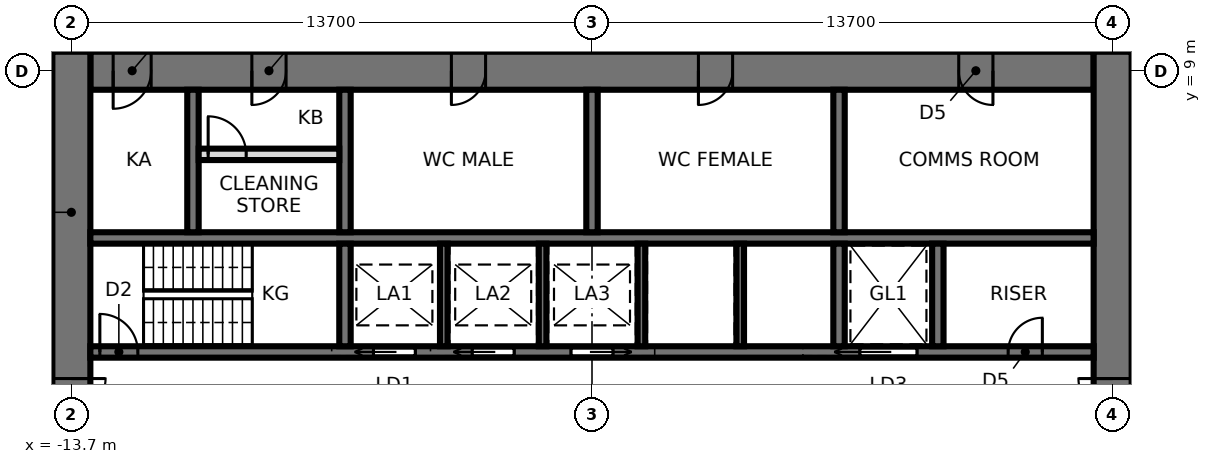
"""IFC4 building model, lengths in metres.
Left out: names, types, materials, properties, quantities, classifications, styles, units other than length and angle.
Written with IfcOpenShell. Run it as: python <this file> out.ifc"""

import sys

from ifc_helpers import new_model, si_unit, direction, frame, frame_2d, origin, place, context, subcontext, project, spatial, rectangle, extrude, element, fill, save


model = new_model("IFC4")
c1 = context("Model", 3, precision=1e-05, world=origin(), true_north=direction((0.0, 1.0)))
c2 = subcontext(c1, "Body", "Model", "MODEL_VIEW")
j1 = project(units=[si_unit("LENGTHUNIT", "METRE"), si_unit("PLANEANGLEUNIT", "RADIAN")], contexts=[c1])
p1 = place(None, origin())
s1 = spatial("IfcSite", under=j1, at=p1, CompositionType="ELEMENT")
p2 = place(p1, origin())
s2 = spatial("IfcBuilding", under=s1, at=p2, CompositionType="ELEMENT")
p3 = place(p2, frame((0.0, 0.0, 65.8)))
s3 = spatial("IfcBuildingStorey", under=s2, at=p3, CompositionType="ELEMENT", Elevation=65.8)
p4 = place(p3, frame((13.2, 9.0, 0.0), z_axis=(0.0, 0.0, 1.0), x_axis=(-1.0, 0.0, 0.0)))
e1 = element("IfcWall", 1, at=p4, inside=s3, PredefinedType="SHEAR", context=c2, shape_type="SweptSolid", body=[
    extrude(rectangle(XDim=26.4, YDim=1.0, at=frame_2d((13.2, 0.0))), origin(), (0.0, 0.0, 1.0), 4.2),
])
p5 = place(p4, frame((2.65, 0.0, 0.0)))
e2 = element("IfcOpeningElement", 2, at=p5, cuts=e1, PredefinedType="OPENING", context=c2, shape_type="SweptSolid", body=[
    extrude(rectangle(XDim=0.9, YDim=2.1, at=frame_2d((0.45, 1.05))), frame((0.0, 0.51, 0.0), z_axis=(0.0, -1.0, 0.0), x_axis=(1.0, 0.0, 0.0)), (0.0, 0.0, 1.0), 1.02),
])
p6 = place(p4, frame((9.5, 0.0, 0.0)))
e3 = element("IfcOpeningElement", 3, at=p6, cuts=e1, PredefinedType="OPENING", context=c2, shape_type="SweptSolid", body=[
    extrude(rectangle(XDim=0.9, YDim=2.1, at=frame_2d((0.45, 1.05))), frame((0.0, 0.51, 0.0), z_axis=(0.0, -1.0, 0.0), x_axis=(1.0, 0.0, 0.0)), (0.0, 0.0, 1.0), 1.02),
])
p7 = place(p4, frame((16.0, 0.0, 0.0)))
e4 = element("IfcOpeningElement", 4, at=p7, cuts=e1, PredefinedType="OPENING", context=c2, shape_type="SweptSolid", body=[
    extrude(rectangle(XDim=0.9, YDim=2.1, at=frame_2d((0.45, 1.05))), frame((0.0, 0.51, 0.0), z_axis=(0.0, -1.0, 0.0), x_axis=(1.0, 0.0, 0.0)), (0.0, 0.0, 1.0), 1.02),
])
p8 = place(p4, frame((21.25, 0.0, 0.0)))
e5 = element("IfcOpeningElement", 5, at=p8, cuts=e1, PredefinedType="OPENING", context=c2, shape_type="SweptSolid", body=[
    extrude(rectangle(XDim=0.9, YDim=2.1, at=frame_2d((0.45, 1.05))), frame((0.0, 0.51, 0.0), z_axis=(0.0, -1.0, 0.0), x_axis=(1.0, 0.0, 0.0)), (0.0, 0.0, 1.0), 1.02),
])
p9 = place(p4, frame((24.8, 0.0, 0.0)))
e6 = element("IfcOpeningElement", 6, at=p9, cuts=e1, PredefinedType="OPENING", context=c2, shape_type="SweptSolid", body=[
    extrude(rectangle(XDim=1.0, YDim=2.1, at=frame_2d((0.5, 1.05))), frame((0.0, 0.51, 0.0), z_axis=(0.0, -1.0, 0.0), x_axis=(1.0, 0.0, 0.0)), (0.0, 0.0, 1.0), 1.02),
])
p10 = place(p3, frame((13.7, -9.5, 0.0), z_axis=(0.0, 0.0, 1.0), x_axis=(0.0, 1.0, 0.0)))
e7 = element("IfcWall", 7, at=p10, inside=s3, PredefinedType="SHEAR", context=c2, shape_type="SweptSolid", body=[
    extrude(rectangle(XDim=19.0, YDim=1.0, at=frame_2d((9.5, 0.0))), origin(), (0.0, 0.0, 1.0), 4.2),
])
p11 = place(p10, frame((8.6, 0.0, 0.0)))
e8 = element("IfcOpeningElement", 8, at=p11, cuts=e7, PredefinedType="OPENING", context=c2, shape_type="SweptSolid", body=[
    extrude(rectangle(XDim=1.8, YDim=2.4, at=frame_2d((0.9, 1.2))), frame((0.0, 0.51, 0.0), z_axis=(0.0, -1.0, 0.0), x_axis=(1.0, 0.0, 0.0)), (0.0, 0.0, 1.0), 1.02),
])
p12 = place(p3, frame((-13.7, 9.5, 0.0), z_axis=(0.0, 0.0, 1.0), x_axis=(0.0, -1.0, 0.0)))
e9 = element("IfcWall", 9, at=p12, inside=s3, PredefinedType="SHEAR", context=c2, shape_type="SweptSolid", body=[
    extrude(rectangle(XDim=19.0, YDim=1.0, at=frame_2d((9.5, 0.0))), origin(), (0.0, 0.0, 1.0), 4.2),
])
p13 = place(p12, frame((8.6, 0.0, 0.0)))
e10 = element("IfcOpeningElement", 10, at=p13, cuts=e9, PredefinedType="OPENING", context=c2, shape_type="SweptSolid", body=[
    extrude(rectangle(XDim=1.8, YDim=2.4, at=frame_2d((0.9, 1.2))), frame((0.0, 0.51, 0.0), z_axis=(0.0, -1.0, 0.0), x_axis=(1.0, 0.0, 0.0)), (0.0, 0.0, 1.0), 1.02),
])
p14 = place(p3, frame((-13.2, 1.6, 0.0), z_axis=(0.0, 0.0, 1.0), x_axis=(1.0, 0.0, 0.0)))
e11 = element("IfcWall", 11, at=p14, inside=s3, PredefinedType="SHEAR", context=c2, shape_type="SweptSolid", body=[
    extrude(rectangle(XDim=26.4, YDim=0.3, at=frame_2d((13.2, 0.0))), origin(), (0.0, 0.0, 1.0), 4.2),
])
p15 = place(p14, frame((0.25, 0.0, 0.0)))
e12 = element("IfcOpeningElement", 12, at=p15, cuts=e11, PredefinedType="OPENING", context=c2, shape_type="SweptSolid", body=[
    extrude(rectangle(XDim=1.0, YDim=2.1, at=frame_2d((0.5, 1.05))), frame((0.0, 0.16, 0.0), z_axis=(0.0, -1.0, 0.0), x_axis=(1.0, 0.0, 0.0)), (0.0, 0.0, 1.0), 0.32),
])
p16 = place(p14, frame((20.25, 0.0, 0.0)))
e13 = element("IfcOpeningElement", 13, at=p16, cuts=e11, PredefinedType="OPENING", context=c2, shape_type="SweptSolid", body=[
    extrude(rectangle(XDim=1.5, YDim=2.4, at=frame_2d((0.75, 1.2))), frame((0.0, 0.16, 0.0), z_axis=(0.0, -1.0, 0.0), x_axis=(1.0, 0.0, 0.0)), (0.0, 0.0, 1.0), 0.32),
])
p17 = place(p14, frame((7.45, 0.0, 0.0)))
e14 = element("IfcOpeningElement", 14, at=p17, cuts=e11, PredefinedType="OPENING", context=c2, shape_type="SweptSolid", body=[
    extrude(rectangle(XDim=1.1, YDim=2.3, at=frame_2d((0.55, 1.15))), frame((0.0, 0.16, 0.0), z_axis=(0.0, -1.0, 0.0), x_axis=(1.0, 0.0, 0.0)), (0.0, 0.0, 1.0), 0.32),
])
p18 = place(p14, frame((10.05, 0.0, 0.0)))
e15 = element("IfcOpeningElement", 15, at=p18, cuts=e11, PredefinedType="OPENING", context=c2, shape_type="SweptSolid", body=[
    extrude(rectangle(XDim=1.1, YDim=2.3, at=frame_2d((0.55, 1.15))), frame((0.0, 0.16, 0.0), z_axis=(0.0, -1.0, 0.0), x_axis=(1.0, 0.0, 0.0)), (0.0, 0.0, 1.0), 0.32),
])
p19 = place(p14, frame((12.65, 0.0, 0.0)))
e16 = element("IfcOpeningElement", 16, at=p19, cuts=e11, PredefinedType="OPENING", context=c2, shape_type="SweptSolid", body=[
    extrude(rectangle(XDim=1.1, YDim=2.3, at=frame_2d((0.55, 1.15))), frame((0.0, 0.16, 0.0), z_axis=(0.0, -1.0, 0.0), x_axis=(1.0, 0.0, 0.0)), (0.0, 0.0, 1.0), 0.32),
])
p20 = place(p14, frame((24.15, 0.0, 0.0)))
e17 = element("IfcOpeningElement", 17, at=p20, cuts=e11, PredefinedType="OPENING", context=c2, shape_type="SweptSolid", body=[
    extrude(rectangle(XDim=0.9, YDim=2.1, at=frame_2d((0.45, 1.05))), frame((0.0, 0.16, 0.0), z_axis=(0.0, -1.0, 0.0), x_axis=(1.0, 0.0, 0.0)), (0.0, 0.0, 1.0), 0.32),
])
p21 = place(p3, frame((-13.2, 4.6, 0.0), z_axis=(0.0, 0.0, 1.0), x_axis=(1.0, 0.0, 0.0)))
e18 = element("IfcWall", 18, at=p21, inside=s3, PredefinedType="SHEAR", context=c2, shape_type="SweptSolid", body=[
    extrude(rectangle(XDim=26.4, YDim=0.3, at=frame_2d((13.2, 0.0))), origin(), (0.0, 0.0, 1.0), 4.2),
])
p22 = place(p3, frame((-6.5, 1.75, 0.0), z_axis=(0.0, 0.0, 1.0), x_axis=(0.0, 1.0, 0.0)))
e19 = element("IfcWall", 19, at=p22, inside=s3, PredefinedType="SHEAR", context=c2, shape_type="SweptSolid", body=[
    extrude(rectangle(XDim=2.7, YDim=0.3, at=frame_2d((1.35, 0.0))), origin(), (0.0, 0.0, 1.0), 4.2),
])
p23 = place(p3, frame((-6.5, 4.75, 0.0), z_axis=(0.0, 0.0, 1.0), x_axis=(0.0, 1.0, 0.0)))
e20 = element("IfcWall", 20, at=p23, inside=s3, PredefinedType="SHEAR", context=c2, shape_type="SweptSolid", body=[
    extrude(rectangle(XDim=3.75, YDim=0.3, at=frame_2d((1.875, 0.0))), origin(), (0.0, 0.0, 1.0), 4.2),
])
p24 = place(p3, frame((6.5, 1.75, 0.0), z_axis=(0.0, 0.0, 1.0), x_axis=(0.0, 1.0, 0.0)))
e21 = element("IfcWall", 21, at=p24, inside=s3, PredefinedType="SHEAR", context=c2, shape_type="SweptSolid", body=[
    extrude(rectangle(XDim=2.7, YDim=0.3, at=frame_2d((1.35, 0.0))), origin(), (0.0, 0.0, 1.0), 4.2),
])
p25 = place(p3, frame((6.5, 4.75, 0.0), z_axis=(0.0, 0.0, 1.0), x_axis=(0.0, 1.0, 0.0)))
e22 = element("IfcWall", 22, at=p25, inside=s3, PredefinedType="SHEAR", context=c2, shape_type="SweptSolid", body=[
    extrude(rectangle(XDim=3.75, YDim=0.3, at=frame_2d((1.875, 0.0))), origin(), (0.0, 0.0, 1.0), 4.2),
])
for number, where, z_axis, x_axis in (
    (23, (-3.9, 1.75, 0.0), (0.0, 0.0, 1.0), (0.0, 1.0, 0.0)),
    (24, (-1.3, 1.75, 0.0), (0.0, 0.0, 1.0), (0.0, 1.0, 0.0)),
    (25, (1.3, 1.75, 0.0), (0.0, 0.0, 1.0), (0.0, 1.0, 0.0)),
    (26, (3.9, 1.75, 0.0), (0.0, 0.0, 1.0), (0.0, 1.0, 0.0)),
):
    element("IfcWall", number, at=place(p3, frame(where, z_axis=z_axis, x_axis=x_axis)), inside=s3, PredefinedType="SHEAR", context=c2, shape_type="SweptSolid", body=[
        extrude(rectangle(XDim=2.7, YDim=0.2, at=frame_2d((1.35, 0.0))), origin(), (0.0, 0.0, 1.0), 4.2),
    ])
for number, where, z_axis, x_axis in (
    (27, (0.0, 4.75, 0.0), (0.0, 0.0, 1.0), (0.0, 1.0, 0.0)),
    (28, (-10.5, 4.75, 0.0), (0.0, 0.0, 1.0), (0.0, 1.0, 0.0)),
):
    element("IfcWall", number, at=place(p3, frame(where, z_axis=z_axis, x_axis=x_axis)), inside=s3, PredefinedType="SHEAR", context=c2, shape_type="SweptSolid", body=[
        extrude(rectangle(XDim=3.75, YDim=0.3, at=frame_2d((1.875, 0.0))), origin(), (0.0, 0.0, 1.0), 4.2),
    ])
p26 = place(p3, frame((9.1, 1.75, 0.0), z_axis=(0.0, 0.0, 1.0), x_axis=(0.0, 1.0, 0.0)))
e29 = element("IfcWall", 29, at=p26, inside=s3, PredefinedType="SHEAR", context=c2, shape_type="SweptSolid", body=[
    extrude(rectangle(XDim=2.7, YDim=0.3, at=frame_2d((1.35, 0.0))), origin(), (0.0, 0.0, 1.0), 4.2),
])
p27 = place(p3, frame((-10.35, 6.8, 0.0), z_axis=(0.0, 0.0, 1.0), x_axis=(1.0, 0.0, 0.0)))
e30 = element("IfcWall", 30, at=p27, inside=s3, PredefinedType="PARTITIONING", context=c2, shape_type="SweptSolid", body=[
    extrude(rectangle(XDim=3.7, YDim=0.3, at=frame_2d((1.85, 0.0))), origin(), (0.0, 0.0, 1.0), 4.04),
])
p28 = place(p27, frame((0.25, 0.0, 0.0)))
e31 = element("IfcOpeningElement", 31, at=p28, cuts=e30, PredefinedType="OPENING", context=c2, shape_type="SweptSolid", body=[
    extrude(rectangle(XDim=1.0, YDim=2.4, at=frame_2d((0.5, 1.2))), frame((0.0, 0.16, 0.0), z_axis=(0.0, -1.0, 0.0), x_axis=(1.0, 0.0, 0.0)), (0.0, 0.0, 1.0), 0.32),
])
p29 = place(p13, origin())
e32 = element("IfcDoor", 32, at=p29, inside=s3, OperationType="DOUBLE_DOOR_SINGLE_SWING", PredefinedType="DOOR", context=c2, shape_type="SweptSolid", body=[
    extrude(rectangle(XDim=1.72, YDim=2.36, at=frame_2d((0.9, 1.18))), frame((0.0, 0.025, 0.0), z_axis=(0.0, -1.0, 0.0), x_axis=(1.0, 0.0, 0.0)), (0.0, 0.0, 1.0), 0.05),
    extrude(rectangle(XDim=0.04, YDim=2.4, at=frame_2d((0.02, 1.2))), frame((0.0, 0.25, 0.0), z_axis=(0.0, -1.0, 0.0), x_axis=(1.0, 0.0, 0.0)), (0.0, 0.0, 1.0), 0.5),
    extrude(rectangle(XDim=0.04, YDim=2.4, at=frame_2d((1.78, 1.2))), frame((0.0, 0.25, 0.0), z_axis=(0.0, -1.0, 0.0), x_axis=(1.0, 0.0, 0.0)), (0.0, 0.0, 1.0), 0.5),
    extrude(rectangle(XDim=1.72, YDim=0.04, at=frame_2d((0.9, 2.38))), frame((0.0, 0.25, 0.0), z_axis=(0.0, -1.0, 0.0), x_axis=(1.0, 0.0, 0.0)), (0.0, 0.0, 1.0), 0.5),
])
fill(e10, e32)
p30 = place(p11, origin())
e33 = element("IfcDoor", 33, at=p30, inside=s3, OperationType="DOUBLE_DOOR_SINGLE_SWING", PredefinedType="DOOR", context=c2, shape_type="SweptSolid", body=[
    extrude(rectangle(XDim=1.72, YDim=2.36, at=frame_2d((0.9, 1.18))), frame((0.0, 0.025, 0.0), z_axis=(0.0, -1.0, 0.0), x_axis=(1.0, 0.0, 0.0)), (0.0, 0.0, 1.0), 0.05),
    extrude(rectangle(XDim=0.04, YDim=2.4, at=frame_2d((0.02, 1.2))), frame((0.0, 0.25, 0.0), z_axis=(0.0, -1.0, 0.0), x_axis=(1.0, 0.0, 0.0)), (0.0, 0.0, 1.0), 0.5),
    extrude(rectangle(XDim=0.04, YDim=2.4, at=frame_2d((1.78, 1.2))), frame((0.0, 0.25, 0.0), z_axis=(0.0, -1.0, 0.0), x_axis=(1.0, 0.0, 0.0)), (0.0, 0.0, 1.0), 0.5),
    extrude(rectangle(XDim=1.72, YDim=0.04, at=frame_2d((0.9, 2.38))), frame((0.0, 0.25, 0.0), z_axis=(0.0, -1.0, 0.0), x_axis=(1.0, 0.0, 0.0)), (0.0, 0.0, 1.0), 0.5),
])
fill(e8, e33)
p31 = place(p15, origin())
e34 = element("IfcDoor", 34, at=p31, inside=s3, OperationType="SINGLE_SWING_LEFT", PredefinedType="DOOR", context=c2, shape_type="SweptSolid", body=[
    extrude(rectangle(XDim=1.0, YDim=2.1, at=frame_2d((0.5, 1.05))), frame((0.0, 0.025, 0.0), z_axis=(0.0, -1.0, 0.0), x_axis=(1.0, 0.0, 0.0)), (0.0, 0.0, 1.0), 0.05),
])
fill(e12, e34)
p32 = place(p16, origin())
e35 = element("IfcDoor", 35, at=p32, inside=s3, OperationType="SLIDING_TO_LEFT", PredefinedType="DOOR", context=c2, shape_type="SweptSolid", body=[
    extrude(rectangle(XDim=1.5, YDim=2.4, at=frame_2d((0.75, 1.2))), frame((0.0, 0.025, 0.0), z_axis=(0.0, -1.0, 0.0), x_axis=(1.0, 0.0, 0.0)), (0.0, 0.0, 1.0), 0.05),
])
fill(e13, e35)
p33 = place(p17, origin())
e36 = element("IfcDoor", 36, at=p33, inside=s3, OperationType="SLIDING_TO_LEFT", PredefinedType="DOOR", context=c2, shape_type="SweptSolid", body=[
    extrude(rectangle(XDim=1.1, YDim=2.3, at=frame_2d((0.55, 1.15))), frame((0.0, 0.025, 0.0), z_axis=(0.0, -1.0, 0.0), x_axis=(1.0, 0.0, 0.0)), (0.0, 0.0, 1.0), 0.05),
])
fill(e14, e36)
p34 = place(p18, origin())
e37 = element("IfcDoor", 37, at=p34, inside=s3, OperationType="SLIDING_TO_LEFT", PredefinedType="DOOR", context=c2, shape_type="SweptSolid", body=[
    extrude(rectangle(XDim=1.1, YDim=2.3, at=frame_2d((0.55, 1.15))), frame((0.0, 0.025, 0.0), z_axis=(0.0, -1.0, 0.0), x_axis=(1.0, 0.0, 0.0)), (0.0, 0.0, 1.0), 0.05),
])
fill(e15, e37)
p35 = place(p19, origin())
e38 = element("IfcDoor", 38, at=p35, inside=s3, OperationType="SLIDING_TO_RIGHT", PredefinedType="DOOR", context=c2, shape_type="SweptSolid", body=[
    extrude(rectangle(XDim=1.1, YDim=2.3, at=frame_2d((0.55, 1.15))), frame((0.0, 0.025, 0.0), z_axis=(0.0, -1.0, 0.0), x_axis=(1.0, 0.0, 0.0)), (0.0, 0.0, 1.0), 0.05),
])
fill(e16, e38)
p36 = place(p20, origin())
e39 = element("IfcDoor", 39, at=p36, inside=s3, OperationType="SINGLE_SWING_RIGHT", PredefinedType="DOOR", context=c2, shape_type="SweptSolid", body=[
    extrude(rectangle(XDim=0.9, YDim=2.1, at=frame_2d((0.45, 1.05))), frame((0.0, 0.025, 0.0), z_axis=(0.0, -1.0, 0.0), x_axis=(1.0, 0.0, 0.0)), (0.0, 0.0, 1.0), 0.05),
])
fill(e17, e39)
p37 = place(p5, origin())
e40 = element("IfcDoor", 40, at=p37, inside=s3, OperationType="SINGLE_SWING_LEFT", PredefinedType="DOOR", context=c2, shape_type="SweptSolid", body=[
    extrude(rectangle(XDim=0.82, YDim=2.06, at=frame_2d((0.45, 1.03))), frame((0.0, 0.025, 0.0), z_axis=(0.0, -1.0, 0.0), x_axis=(1.0, 0.0, 0.0)), (0.0, 0.0, 1.0), 0.05),
    extrude(rectangle(XDim=0.04, YDim=2.1, at=frame_2d((0.02, 1.05))), frame((0.0, 0.25, 0.0), z_axis=(0.0, -1.0, 0.0), x_axis=(1.0, 0.0, 0.0)), (0.0, 0.0, 1.0), 0.5),
    extrude(rectangle(XDim=0.04, YDim=2.1, at=frame_2d((0.88, 1.05))), frame((0.0, 0.25, 0.0), z_axis=(0.0, -1.0, 0.0), x_axis=(1.0, 0.0, 0.0)), (0.0, 0.0, 1.0), 0.5),
    extrude(rectangle(XDim=0.82, YDim=0.04, at=frame_2d((0.45, 2.08))), frame((0.0, 0.25, 0.0), z_axis=(0.0, -1.0, 0.0), x_axis=(1.0, 0.0, 0.0)), (0.0, 0.0, 1.0), 0.5),
])
fill(e2, e40)
p38 = place(p6, origin())
e41 = element("IfcDoor", 41, at=p38, inside=s3, OperationType="SINGLE_SWING_RIGHT", PredefinedType="DOOR", context=c2, shape_type="SweptSolid", body=[
    extrude(rectangle(XDim=0.82, YDim=2.06, at=frame_2d((0.45, 1.03))), frame((0.0, 0.025, 0.0), z_axis=(0.0, -1.0, 0.0), x_axis=(1.0, 0.0, 0.0)), (0.0, 0.0, 1.0), 0.05),
    extrude(rectangle(XDim=0.04, YDim=2.1, at=frame_2d((0.02, 1.05))), frame((0.0, 0.25, 0.0), z_axis=(0.0, -1.0, 0.0), x_axis=(1.0, 0.0, 0.0)), (0.0, 0.0, 1.0), 0.5),
    extrude(rectangle(XDim=0.04, YDim=2.1, at=frame_2d((0.88, 1.05))), frame((0.0, 0.25, 0.0), z_axis=(0.0, -1.0, 0.0), x_axis=(1.0, 0.0, 0.0)), (0.0, 0.0, 1.0), 0.5),
    extrude(rectangle(XDim=0.82, YDim=0.04, at=frame_2d((0.45, 2.08))), frame((0.0, 0.25, 0.0), z_axis=(0.0, -1.0, 0.0), x_axis=(1.0, 0.0, 0.0)), (0.0, 0.0, 1.0), 0.5),
])
fill(e3, e41)
p39 = place(p7, origin())
e42 = element("IfcDoor", 42, at=p39, inside=s3, OperationType="SINGLE_SWING_RIGHT", PredefinedType="DOOR", context=c2, shape_type="SweptSolid", body=[
    extrude(rectangle(XDim=0.82, YDim=2.06, at=frame_2d((0.45, 1.03))), frame((0.0, 0.025, 0.0), z_axis=(0.0, -1.0, 0.0), x_axis=(1.0, 0.0, 0.0)), (0.0, 0.0, 1.0), 0.05),
    extrude(rectangle(XDim=0.04, YDim=2.1, at=frame_2d((0.02, 1.05))), frame((0.0, 0.25, 0.0), z_axis=(0.0, -1.0, 0.0), x_axis=(1.0, 0.0, 0.0)), (0.0, 0.0, 1.0), 0.5),
    extrude(rectangle(XDim=0.04, YDim=2.1, at=frame_2d((0.88, 1.05))), frame((0.0, 0.25, 0.0), z_axis=(0.0, -1.0, 0.0), x_axis=(1.0, 0.0, 0.0)), (0.0, 0.0, 1.0), 0.5),
    extrude(rectangle(XDim=0.82, YDim=0.04, at=frame_2d((0.45, 2.08))), frame((0.0, 0.25, 0.0), z_axis=(0.0, -1.0, 0.0), x_axis=(1.0, 0.0, 0.0)), (0.0, 0.0, 1.0), 0.5),
])
fill(e4, e42)
p40 = place(p8, origin())
e43 = element("IfcDoor", 43, at=p40, inside=s3, OperationType="SINGLE_SWING_RIGHT", PredefinedType="DOOR", context=c2, shape_type="SweptSolid", body=[
    extrude(rectangle(XDim=0.82, YDim=2.06, at=frame_2d((0.45, 1.03))), frame((0.0, 0.025, 0.0), z_axis=(0.0, -1.0, 0.0), x_axis=(1.0, 0.0, 0.0)), (0.0, 0.0, 1.0), 0.05),
    extrude(rectangle(XDim=0.04, YDim=2.1, at=frame_2d((0.02, 1.05))), frame((0.0, 0.25, 0.0), z_axis=(0.0, -1.0, 0.0), x_axis=(1.0, 0.0, 0.0)), (0.0, 0.0, 1.0), 0.5),
    extrude(rectangle(XDim=0.04, YDim=2.1, at=frame_2d((0.88, 1.05))), frame((0.0, 0.25, 0.0), z_axis=(0.0, -1.0, 0.0), x_axis=(1.0, 0.0, 0.0)), (0.0, 0.0, 1.0), 0.5),
    extrude(rectangle(XDim=0.82, YDim=0.04, at=frame_2d((0.45, 2.08))), frame((0.0, 0.25, 0.0), z_axis=(0.0, -1.0, 0.0), x_axis=(1.0, 0.0, 0.0)), (0.0, 0.0, 1.0), 0.5),
])
fill(e5, e43)
p41 = place(p9, origin())
e44 = element("IfcDoor", 44, at=p41, inside=s3, OperationType="SINGLE_SWING_RIGHT", PredefinedType="DOOR", context=c2, shape_type="SweptSolid", body=[
    extrude(rectangle(XDim=0.92, YDim=2.06, at=frame_2d((0.5, 1.03))), frame((0.0, 0.025, 0.0), z_axis=(0.0, -1.0, 0.0), x_axis=(1.0, 0.0, 0.0)), (0.0, 0.0, 1.0), 0.05),
    extrude(rectangle(XDim=0.04, YDim=2.1, at=frame_2d((0.02, 1.05))), frame((0.0, 0.25, 0.0), z_axis=(0.0, -1.0, 0.0), x_axis=(1.0, 0.0, 0.0)), (0.0, 0.0, 1.0), 0.5),
    extrude(rectangle(XDim=0.04, YDim=2.1, at=frame_2d((0.98, 1.05))), frame((0.0, 0.25, 0.0), z_axis=(0.0, -1.0, 0.0), x_axis=(1.0, 0.0, 0.0)), (0.0, 0.0, 1.0), 0.5),
    extrude(rectangle(XDim=0.92, YDim=0.04, at=frame_2d((0.5, 2.08))), frame((0.0, 0.25, 0.0), z_axis=(0.0, -1.0, 0.0), x_axis=(1.0, 0.0, 0.0)), (0.0, 0.0, 1.0), 0.5),
])
fill(e6, e44)
p42 = place(p28, origin())
e45 = element("IfcDoor", 45, at=p42, inside=s3, OperationType="SINGLE_SWING_LEFT", PredefinedType="DOOR", context=c2, shape_type="SweptSolid", body=[
    extrude(rectangle(XDim=1.0, YDim=2.4, at=frame_2d((0.5, 1.2))), frame((0.0, 0.025, 0.0), z_axis=(0.0, -1.0, 0.0), x_axis=(1.0, 0.0, 0.0)), (0.0, 0.0, 1.0), 0.05),
])
fill(e31, e45)
save(model, sys.argv[1])
